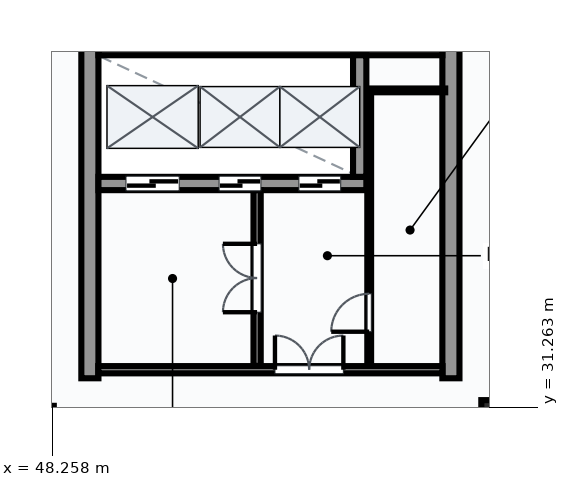
"""IFC4 building model, lengths in metres.
Left out: names, types, materials, properties, quantities, classifications, styles, units other than length and angle.
Written with IfcOpenShell. Run it as: python <this file> out.ifc"""

import sys

from ifc_helpers import new_model, si_unit, direction, frame, frame_2d, origin, origin_2d, place, context, subcontext, project, spatial, rectangle, extrude, element, fill, save


model = new_model("IFC4")
c1 = context("Model", 3, precision=1e-05, world=origin(), true_north=direction((0.0, 1.0)))
c2 = subcontext(c1, "Body", "Model", "MODEL_VIEW")
j1 = project(units=[si_unit("LENGTHUNIT", "METRE"), si_unit("PLANEANGLEUNIT", "RADIAN")], contexts=[c1])
p1 = place(None, origin())
s1 = spatial("IfcSite", under=j1, at=p1, CompositionType="ELEMENT")
p2 = place(p1, origin())
s2 = spatial("IfcBuilding", under=s1, at=p2, CompositionType="ELEMENT")
p3 = place(p2, frame((0.0, 0.0, 19.2)))
s3 = spatial("IfcBuildingStorey", under=s2, at=p3, CompositionType="ELEMENT", Elevation=19.2)
p4 = place(p3, frame((48.0, 31.0, 0.0), z_axis=(0.0, 0.0, 1.0), x_axis=(1.0, 0.0, 0.0)))
e1 = element("IfcColumn", 1, at=p4, inside=s3, PredefinedType="COLUMN", context=c2, shape_type="SweptSolid", body=[
    extrude(rectangle(XDim=0.6, YDim=0.6, at=origin_2d()), origin(), (0.0, 0.0, 1.0), 5.4),
])
p5 = place(p3, frame((60.0, 31.0, 0.0), z_axis=(0.0, 0.0, 1.0), x_axis=(1.0, 0.0, 0.0)))
e2 = element("IfcColumn", 2, at=p5, inside=s3, PredefinedType="COLUMN", context=c2, shape_type="SweptSolid", body=[
    extrude(rectangle(XDim=0.9, YDim=0.9, at=origin_2d()), origin(), (0.0, 0.0, 1.0), 5.4),
])
for number, where, z_axis, x_axis in (
    (3, (49.25, 32.025, 0.0), (0.0, 0.0, 1.0), (0.0, 1.0, 0.0)),
    (4, (58.75, 32.025, 0.0), (0.0, 0.0, 1.0), (0.0, 1.0, 0.0)),
):
    element("IfcWall", number, at=place(p3, frame(where, z_axis=z_axis, x_axis=x_axis)), inside=s3, PredefinedType="SHEAR", context=c2, shape_type="SweptSolid", body=[
        extrude(rectangle(XDim=8.95, YDim=0.45, at=frame_2d((4.475, 0.0))), origin(), (0.0, 0.0, 1.0), 5.4),
    ])
p6 = place(p3, frame((49.475, 40.75, 0.0), z_axis=(0.0, 0.0, 1.0), x_axis=(1.0, 0.0, 0.0)))
e5 = element("IfcWall", 5, at=p6, inside=s3, PredefinedType="SHEAR", context=c2, shape_type="SweptSolid", body=[
    extrude(rectangle(XDim=9.05, YDim=0.45, at=frame_2d((4.525, 0.0))), origin(), (0.0, 0.0, 1.0), 5.4),
])
p7 = place(p3, frame((49.475, 37.15, 0.0), z_axis=(0.0, 0.0, 1.0), x_axis=(1.0, 0.0, 0.0)))
e6 = element("IfcWall", 6, at=p7, inside=s3, PredefinedType="SHEAR", context=c2, shape_type="SweptSolid", body=[
    extrude(rectangle(XDim=7.05, YDim=0.35, at=frame_2d((3.525, 0.0))), origin(), (0.0, 0.0, 1.0), 5.4),
])
p8 = place(p7, frame((0.725, 0.0, 0.0)))
e7 = element("IfcOpeningElement", 7, at=p8, cuts=e6, PredefinedType="OPENING", context=c2, shape_type="SweptSolid", body=[
    extrude(rectangle(XDim=1.4, YDim=2.3, at=frame_2d((0.7, 1.15))), frame((0.0, 0.185, 0.0), z_axis=(0.0, -1.0, 0.0), x_axis=(1.0, 0.0, 0.0)), (0.0, 0.0, 1.0), 0.37),
])
p9 = place(p7, frame((3.175, 0.0, 0.0)))
e8 = element("IfcOpeningElement", 8, at=p9, cuts=e6, PredefinedType="OPENING", context=c2, shape_type="SweptSolid", body=[
    extrude(rectangle(XDim=1.1, YDim=2.2, at=frame_2d((0.55, 1.1))), frame((0.0, 0.185, 0.0), z_axis=(0.0, -1.0, 0.0), x_axis=(1.0, 0.0, 0.0)), (0.0, 0.0, 1.0), 0.37),
])
p10 = place(p7, frame((5.275, 0.0, 0.0)))
e9 = element("IfcOpeningElement", 9, at=p10, cuts=e6, PredefinedType="OPENING", context=c2, shape_type="SweptSolid", body=[
    extrude(rectangle(XDim=1.1, YDim=2.2, at=frame_2d((0.55, 1.1))), frame((0.0, 0.185, 0.0), z_axis=(0.0, -1.0, 0.0), x_axis=(1.0, 0.0, 0.0)), (0.0, 0.0, 1.0), 0.37),
])
p11 = place(p3, frame((56.35, 37.325, 0.0), z_axis=(0.0, 0.0, 1.0), x_axis=(0.0, 1.0, 0.0)))
e10 = element("IfcWall", 10, at=p11, inside=s3, PredefinedType="SHEAR", context=c2, shape_type="SweptSolid", body=[
    extrude(rectangle(XDim=3.2, YDim=0.35, at=frame_2d((1.6, 0.0))), origin(), (0.0, 0.0, 1.0), 5.4),
])
p12 = place(p3, frame((49.47, 32.25, 0.0), z_axis=(0.0, 0.0, 1.0), x_axis=(1.0, 0.0, 0.0)))
e11 = element("IfcWall", 11, at=p12, inside=s3, PredefinedType="PARTITIONING", context=c2, shape_type="SweptSolid", body=[
    extrude(rectangle(XDim=9.06, YDim=0.19, at=frame_2d((4.53, 0.0))), origin(), (0.0, 0.0, 1.0), 5.07),
])
p13 = place(p12, frame((4.65, 0.0, 0.0)))
e12 = element("IfcOpeningElement", 12, at=p13, cuts=e11, PredefinedType="OPENING", context=c2, shape_type="SweptSolid", body=[
    extrude(rectangle(XDim=1.8, YDim=2.3, at=frame_2d((0.9, 1.15))), frame((0.0, 0.105, 0.0), z_axis=(0.0, -1.0, 0.0), x_axis=(1.0, 0.0, 0.0)), (0.0, 0.0, 1.0), 0.21),
])
p14 = place(p3, frame((53.65, 32.35, 0.0), z_axis=(0.0, 0.0, 1.0), x_axis=(0.0, 1.0, 0.0)))
e13 = element("IfcWall", 13, at=p14, inside=s3, PredefinedType="PARTITIONING", context=c2, shape_type="SweptSolid", body=[
    extrude(rectangle(XDim=4.625, YDim=0.19, at=frame_2d((2.312, 0.0))), origin(), (0.0, 0.0, 1.0), 5.07),
])
p15 = place(p14, frame((1.413, 0.0, 0.0)))
e14 = element("IfcOpeningElement", 14, at=p15, cuts=e13, PredefinedType="OPENING", context=c2, shape_type="SweptSolid", body=[
    extrude(rectangle(XDim=1.8, YDim=2.2, at=frame_2d((0.9, 1.1))), frame((0.0, 0.105, 0.0), z_axis=(0.0, -1.0, 0.0), x_axis=(1.0, 0.0, 0.0)), (0.0, 0.0, 1.0), 0.21),
])
p16 = place(p3, frame((56.6, 32.35, 0.0), z_axis=(0.0, 0.0, 1.0), x_axis=(0.0, 1.0, 0.0)))
e15 = element("IfcWall", 15, at=p16, inside=s3, PredefinedType="PARTITIONING", context=c2, shape_type="SweptSolid", body=[
    extrude(rectangle(XDim=7.25, YDim=0.1, at=frame_2d((3.625, 0.0))), origin(), (0.0, 0.0, 1.0), 5.07),
])
p17 = place(p16, frame((0.9, 0.0, 0.0)))
e16 = element("IfcOpeningElement", 16, at=p17, cuts=e15, PredefinedType="OPENING", context=c2, shape_type="SweptSolid", body=[
    extrude(rectangle(XDim=1.0, YDim=2.1, at=frame_2d((0.5, 1.05))), frame((0.0, 0.06, 0.0), z_axis=(0.0, -1.0, 0.0), x_axis=(1.0, 0.0, 0.0)), (0.0, 0.0, 1.0), 0.12),
])
p18 = place(p3, frame((56.6, 39.6, 0.0), z_axis=(0.0, 0.0, 1.0), x_axis=(1.0, 0.0, 0.0)))
e17 = element("IfcWall", 17, at=p18, inside=s3, PredefinedType="PARTITIONING", context=c2, shape_type="SweptSolid", body=[
    extrude(rectangle(XDim=2.0, YDim=0.1, at=frame_2d((1.0, 0.0))), origin(), (0.0, 0.0, 1.0), 5.07),
])
p19 = place(p8, origin())
e18 = element("IfcDoor", 18, at=p19, inside=s3, OperationType="SLIDING_TO_LEFT", PredefinedType="DOOR", context=c2, shape_type="SweptSolid", body=[
    extrude(rectangle(XDim=1.4, YDim=2.3, at=frame_2d((0.7, 1.15))), frame((0.0, 0.025, 0.0), z_axis=(0.0, -1.0, 0.0), x_axis=(1.0, 0.0, 0.0)), (0.0, 0.0, 1.0), 0.05),
])
fill(e7, e18)
p20 = place(p9, origin())
e19 = element("IfcDoor", 19, at=p20, inside=s3, OperationType="SLIDING_TO_LEFT", PredefinedType="DOOR", context=c2, shape_type="SweptSolid", body=[
    extrude(rectangle(XDim=1.1, YDim=2.2, at=frame_2d((0.55, 1.1))), frame((0.0, 0.025, 0.0), z_axis=(0.0, -1.0, 0.0), x_axis=(1.0, 0.0, 0.0)), (0.0, 0.0, 1.0), 0.05),
])
fill(e8, e19)
p21 = place(p10, origin())
e20 = element("IfcDoor", 20, at=p21, inside=s3, OperationType="SLIDING_TO_LEFT", PredefinedType="DOOR", context=c2, shape_type="SweptSolid", body=[
    extrude(rectangle(XDim=1.1, YDim=2.2, at=frame_2d((0.55, 1.1))), frame((0.0, 0.025, 0.0), z_axis=(0.0, -1.0, 0.0), x_axis=(1.0, 0.0, 0.0)), (0.0, 0.0, 1.0), 0.05),
])
fill(e9, e20)
p22 = place(p13, origin())
e21 = element("IfcDoor", 21, at=p22, inside=s3, OperationType="DOUBLE_DOOR_SINGLE_SWING", PredefinedType="DOOR", context=c2, shape_type="SweptSolid", body=[
    extrude(rectangle(XDim=1.8, YDim=2.3, at=frame_2d((0.9, 1.15))), frame((0.0, 0.025, 0.0), z_axis=(0.0, -1.0, 0.0), x_axis=(1.0, 0.0, 0.0)), (0.0, 0.0, 1.0), 0.05),
])
fill(e12, e21)
p23 = place(p15, origin())
e22 = element("IfcDoor", 22, at=p23, inside=s3, OperationType="DOUBLE_DOOR_SINGLE_SWING", PredefinedType="DOOR", context=c2, shape_type="SweptSolid", body=[
    extrude(rectangle(XDim=1.8, YDim=2.2, at=frame_2d((0.9, 1.1))), frame((0.0, 0.025, 0.0), z_axis=(0.0, -1.0, 0.0), x_axis=(1.0, 0.0, 0.0)), (0.0, 0.0, 1.0), 0.05),
])
fill(e14, e22)
p24 = place(p17, origin())
e23 = element("IfcDoor", 23, at=p24, inside=s3, OperationType="SINGLE_SWING_LEFT", PredefinedType="DOOR", context=c2, shape_type="SweptSolid", body=[
    extrude(rectangle(XDim=1.0, YDim=2.1, at=frame_2d((0.5, 1.05))), frame((0.0, 0.025, 0.0), z_axis=(0.0, -1.0, 0.0), x_axis=(1.0, 0.0, 0.0)), (0.0, 0.0, 1.0), 0.05),
])
fill(e16, e23)
save(model, sys.argv[1])
